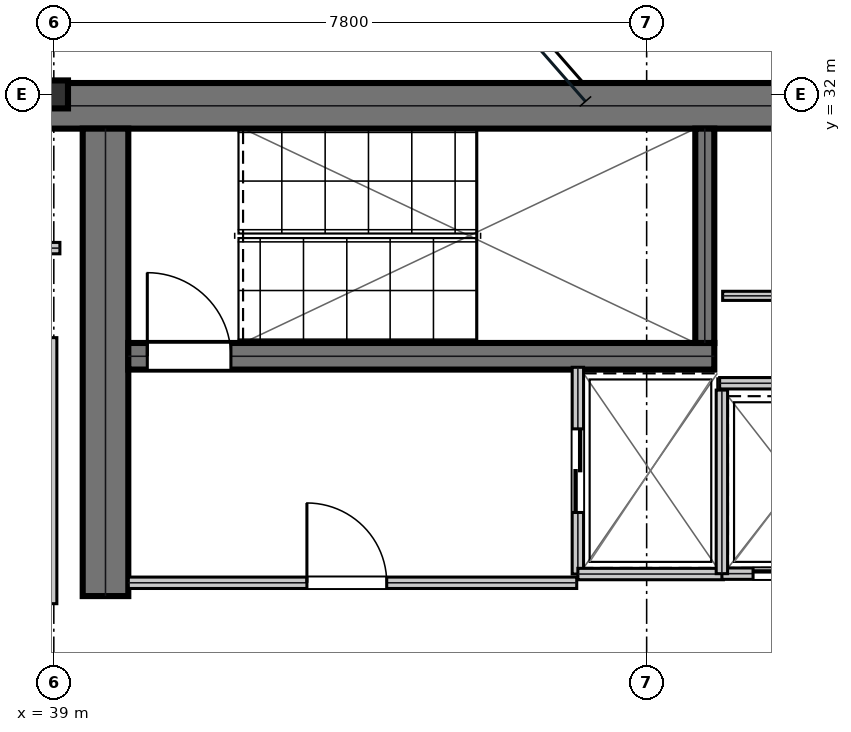
"""IFC4 building model, lengths in metres.
Left out: names, types, materials, properties, quantities, classifications, styles, units other than length and angle.
Written with IfcOpenShell. Run it as: python <this file> out.ifc"""

import sys

from ifc_helpers import new_model, si_unit, direction, frame, frame_2d, origin, origin_2d, place, context, subcontext, project, spatial, rectangle, i_section, extrude, element, fill, save


model = new_model("IFC4")
c1 = context("Model", 3, precision=1e-05, world=origin(), true_north=direction((0.0, 1.0)))
c2 = subcontext(c1, "Body", "Model", "MODEL_VIEW")
j1 = project(units=[si_unit("LENGTHUNIT", "METRE"), si_unit("PLANEANGLEUNIT", "RADIAN")], contexts=[c1])
p1 = place(None, origin())
s1 = spatial("IfcSite", under=j1, at=p1, CompositionType="ELEMENT")
p2 = place(p1, origin())
s2 = spatial("IfcBuilding", under=s1, at=p2, CompositionType="ELEMENT")
p3 = place(p2, frame((0.0, 0.0, 266.85)))
s3 = spatial("IfcBuildingStorey", under=s2, at=p3, CompositionType="ELEMENT", Elevation=266.85)
p4 = place(p3, frame((38.8, 31.85, 0.0), z_axis=(0.0, 0.0, 1.0), x_axis=(1.0, 0.0, 0.0)))
e1 = element("IfcWall", 1, at=p4, inside=s3, PredefinedType="SHEAR", context=c2, shape_type="SweptSolid", body=[
    extrude(rectangle(XDim=16.0, YDim=0.6, at=frame_2d((8.0, 0.0))), origin(), (0.0, 0.0, 1.0), 3.81),
])
p5 = place(p3, frame((39.68, 25.4, 0.0), z_axis=(0.0, 0.0, 1.0), x_axis=(0.0, 1.0, 0.0)))
e2 = element("IfcWall", 2, at=p5, inside=s3, PredefinedType="SHEAR", context=c2, shape_type="SweptSolid", body=[
    extrude(rectangle(XDim=6.15, YDim=0.6, at=frame_2d((3.075, 0.0))), origin(), (0.0, 0.0, 1.0), 3.81),
])
p6 = place(p3, frame((39.98, 28.555, 0.0), z_axis=(0.0, 0.0, 1.0), x_axis=(1.0, 0.0, 0.0)))
e3 = element("IfcWall", 3, at=p6, inside=s3, PredefinedType="SHEAR", context=c2, shape_type="SweptSolid", body=[
    extrude(rectangle(XDim=7.71, YDim=0.35, at=frame_2d((3.855, 0.0))), origin(), (0.0, 0.0, 1.0), 3.81),
])
p7 = place(p6, frame((0.25, 0.0, 0.0)))
e4 = element("IfcOpeningElement", 4, at=p7, cuts=e3, PredefinedType="OPENING", context=c2, shape_type="SweptSolid", body=[
    extrude(rectangle(XDim=1.1, YDim=2.15, at=frame_2d((0.55, 1.075))), frame((0.0, 0.185, 0.0), z_axis=(0.0, -1.0, 0.0), x_axis=(1.0, 0.0, 0.0)), (0.0, 0.0, 1.0), 0.37),
])
p8 = place(p3, frame((47.565, 28.73, 0.0), z_axis=(0.0, 0.0, 1.0), x_axis=(0.0, 1.0, 0.0)))
e5 = element("IfcWall", 5, at=p8, inside=s3, PredefinedType="SHEAR", context=c2, shape_type="SweptSolid", body=[
    extrude(rectangle(XDim=2.82, YDim=0.25, at=frame_2d((1.41, 0.0))), origin(), (0.0, 0.0, 1.0), 3.81),
])
p9 = place(p3, frame((39.0, 32.0, 0.0), z_axis=(0.0, 0.0, 1.0), x_axis=(1.0, 0.0, 0.0)))
e6 = element("IfcColumn", 6, at=p9, inside=s3, PredefinedType="COLUMN", context=c2, shape_type="SweptSolid", body=[
    extrude(i_section(OverallWidth=0.373, OverallDepth=0.368, WebThickness=0.015, FlangeThickness=0.024, at=origin_2d()), origin(), (0.0, 0.0, 1.0), 4.044),
])
p10 = place(p3, frame((39.98, 25.575, 0.0), z_axis=(0.0, 0.0, 1.0), x_axis=(1.0, 0.0, 0.0)))
e7 = element("IfcWall", 7, at=p10, inside=s3, PredefinedType="PARTITIONING", context=c2, shape_type="SweptSolid", body=[
    extrude(rectangle(XDim=5.9, YDim=0.15, at=frame_2d((2.95, 0.0))), origin(), (0.0, 0.0, 1.0), 3.81),
])
p11 = place(p10, frame((2.35, 0.0, 0.0)))
e8 = element("IfcOpeningElement", 8, at=p11, cuts=e7, PredefinedType="OPENING", context=c2, shape_type="SweptSolid", body=[
    extrude(rectangle(XDim=1.05, YDim=2.15, at=frame_2d((0.525, 1.075))), frame((0.0, 0.085, 0.0), z_axis=(0.0, -1.0, 0.0), x_axis=(1.0, 0.0, 0.0)), (0.0, 0.0, 1.0), 0.17),
])
p12 = place(p3, frame((45.895, 25.69, 0.0), z_axis=(0.0, 0.0, 1.0), x_axis=(0.0, 1.0, 0.0)))
e9 = element("IfcWall", 9, at=p12, inside=s3, PredefinedType="PARTITIONING", context=c2, shape_type="SweptSolid", body=[
    extrude(rectangle(XDim=2.72, YDim=0.15, at=frame_2d((1.36, 0.0))), origin(), (0.0, 0.0, 1.0), 3.81),
])
p13 = place(p12, frame((0.81, 0.0, 0.0)))
e10 = element("IfcOpeningElement", 10, at=p13, cuts=e9, PredefinedType="OPENING", context=c2, shape_type="SweptSolid", body=[
    extrude(rectangle(XDim=1.1, YDim=2.15, at=frame_2d((0.55, 1.075))), frame((0.0, 0.085, 0.0), z_axis=(0.0, -1.0, 0.0), x_axis=(1.0, 0.0, 0.0)), (0.0, 0.0, 1.0), 0.17),
])
p14 = place(p3, frame((45.895, 25.69, 0.0), z_axis=(0.0, 0.0, 1.0), x_axis=(1.0, 0.0, 0.0)))
e11 = element("IfcWall", 11, at=p14, inside=s3, PredefinedType="PARTITIONING", context=c2, shape_type="SweptSolid", body=[
    extrude(rectangle(XDim=1.915, YDim=0.15, at=frame_2d((0.958, 0.0))), origin(), (0.0, 0.0, 1.0), 3.81),
])
p15 = place(p3, frame((47.79, 25.695, 0.0), z_axis=(0.0, 0.0, 1.0), x_axis=(1.0, 0.0, 0.0)))
e12 = element("IfcWall", 12, at=p15, inside=s3, PredefinedType="PARTITIONING", context=c2, shape_type="SweptSolid", body=[
    extrude(rectangle(XDim=1.92, YDim=0.15, at=frame_2d((0.96, 0.0))), origin(), (0.0, 0.0, 1.0), 3.81),
])
p16 = place(p15, frame((0.41, 0.0, 0.0)))
e13 = element("IfcOpeningElement", 13, at=p16, cuts=e12, PredefinedType="OPENING", context=c2, shape_type="SweptSolid", body=[
    extrude(rectangle(XDim=1.1, YDim=2.15, at=frame_2d((0.55, 1.075))), frame((0.0, 0.085, 0.0), z_axis=(0.0, -1.0, 0.0), x_axis=(1.0, 0.0, 0.0)), (0.0, 0.0, 1.0), 0.17),
])
p17 = place(p3, frame((47.79, 25.695, 0.0), z_axis=(0.0, 0.0, 1.0), x_axis=(0.0, 1.0, 0.0)))
e14 = element("IfcWall", 14, at=p17, inside=s3, PredefinedType="PARTITIONING", context=c2, shape_type="SweptSolid", body=[
    extrude(rectangle(XDim=2.415, YDim=0.15, at=frame_2d((1.208, 0.0))), origin(), (0.0, 0.0, 1.0), 3.81),
])
p18 = place(p3, frame((47.76, 28.2, 0.0), z_axis=(0.0, 0.0, 1.0), x_axis=(1.0, 0.0, 0.0)))
e15 = element("IfcWall", 15, at=p18, inside=s3, PredefinedType="PARTITIONING", context=c2, shape_type="SweptSolid", body=[
    extrude(rectangle(XDim=2.04, YDim=0.15, at=frame_2d((1.02, 0.0))), origin(), (0.0, 0.0, 1.0), 3.81),
])
p19 = place(p3, frame((47.8, 29.35, 0.0), z_axis=(0.0, 0.0, 1.0), x_axis=(1.0, 0.0, 0.0)))
e16 = element("IfcWall", 16, at=p19, inside=s3, PredefinedType="PARTITIONING", context=c2, shape_type="SweptSolid", body=[
    extrude(rectangle(XDim=5.86, YDim=0.12, at=frame_2d((2.93, 0.0))), origin(), (0.0, 0.0, 1.0), 3.81),
])
p20 = place(p19, frame((2.6, 0.0, 0.0)))
e17 = element("IfcOpeningElement", 17, at=p20, cuts=e16, PredefinedType="OPENING", context=c2, shape_type="SweptSolid", body=[
    extrude(rectangle(XDim=0.85, YDim=2.15, at=frame_2d((0.425, 1.075))), frame((0.0, 0.07, 0.0), z_axis=(0.0, -1.0, 0.0), x_axis=(1.0, 0.0, 0.0)), (0.0, 0.0, 1.0), 0.14),
])
p21 = place(p3, frame((38.95, 25.3, 0.0), z_axis=(0.0, 0.0, 1.0), x_axis=(0.0, 1.0, 0.0)))
e18 = element("IfcWall", 18, at=p21, inside=s3, PredefinedType="SOLIDWALL", context=c2, shape_type="SweptSolid", body=[
    extrude(rectangle(XDim=3.5, YDim=0.18, at=frame_2d((1.75, 0.0))), origin(), (0.0, 0.0, 1.0), 3.54),
])
p22 = place(p3, frame((35.938, 29.978, 0.0), z_axis=(0.0, 0.0, 1.0), x_axis=(1.0, 0.0, 0.0)))
e19 = element("IfcWall", 19, at=p22, inside=s3, PredefinedType="MOVABLE", context=c2, shape_type="SweptSolid", body=[
    extrude(rectangle(XDim=3.142, YDim=0.15, at=frame_2d((1.571, 0.0))), origin(), (0.0, 0.0, 1.0), 3.54),
])
p23 = place(p11, origin())
e20 = element("IfcDoor", 20, at=p23, inside=s3, OperationType="SINGLE_SWING_LEFT", PredefinedType="DOOR", context=c2, shape_type="SweptSolid", body=[
    extrude(rectangle(XDim=1.05, YDim=2.15, at=frame_2d((0.525, 1.075))), frame((0.0, 0.025, 0.0), z_axis=(0.0, -1.0, 0.0), x_axis=(1.0, 0.0, 0.0)), (0.0, 0.0, 1.0), 0.05),
])
fill(e8, e20)
p24 = place(p13, frame((1.1, 0.0, 0.0), z_axis=(0.0, 0.0, 1.0), x_axis=(-1.0, 0.0, 0.0)))
e21 = element("IfcDoor", 21, at=p24, inside=s3, OperationType="DOUBLE_DOOR_SLIDING", PredefinedType="DOOR", context=c2, shape_type="SweptSolid", body=[
    extrude(rectangle(XDim=1.1, YDim=2.15, at=frame_2d((0.55, 1.075))), frame((0.0, 0.025, 0.0), z_axis=(0.0, -1.0, 0.0), x_axis=(1.0, 0.0, 0.0)), (0.0, 0.0, 1.0), 0.05),
])
fill(e10, e21)
p25 = place(p16, frame((1.1, 0.0, 0.0), z_axis=(0.0, 0.0, 1.0), x_axis=(-1.0, 0.0, 0.0)))
e22 = element("IfcDoor", 22, at=p25, inside=s3, OperationType="DOUBLE_DOOR_SLIDING", PredefinedType="DOOR", context=c2, shape_type="SweptSolid", body=[
    extrude(rectangle(XDim=1.1, YDim=2.15, at=frame_2d((0.55, 1.075))), frame((0.0, 0.025, 0.0), z_axis=(0.0, -1.0, 0.0), x_axis=(1.0, 0.0, 0.0)), (0.0, 0.0, 1.0), 0.05),
])
fill(e13, e22)
p26 = place(p7, origin())
e23 = element("IfcDoor", 23, at=p26, inside=s3, OperationType="SINGLE_SWING_LEFT", PredefinedType="DOOR", context=c2, shape_type="SweptSolid", body=[
    extrude(rectangle(XDim=1.1, YDim=2.15, at=frame_2d((0.55, 1.075))), frame((0.0, 0.025, 0.0), z_axis=(0.0, -1.0, 0.0), x_axis=(1.0, 0.0, 0.0)), (0.0, 0.0, 1.0), 0.05),
])
fill(e4, e23)
save(model, sys.argv[1])
